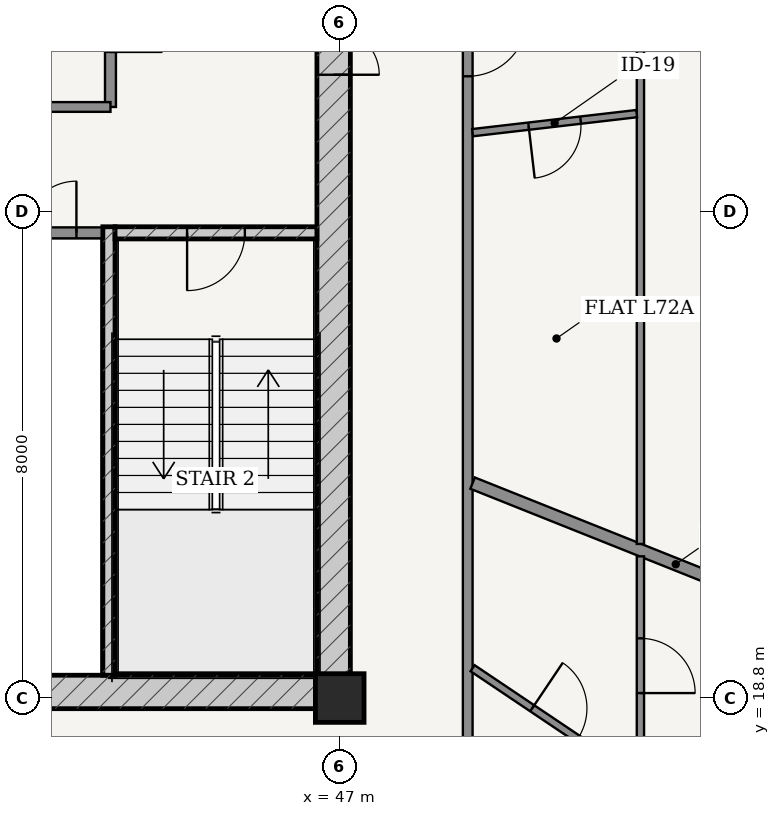
"""IFC4 building model, lengths in metres.
Left out: names, types, materials, properties, quantities, classifications, styles, units other than length and angle.
Written with IfcOpenShell. Run it as: python <this file> out.ifc"""

import sys

from ifc_helpers import new_model, si_unit, direction, frame, frame_2d, origin, origin_2d, place, context, subcontext, project, spatial, rectangle, extrude, source, transform, mapped, element, fill, save


model = new_model("IFC4")
c1 = context("Model", 3, precision=1e-05, world=origin(), true_north=direction((-0.2419218956, 0.970295726276)))
c2 = subcontext(c1, "Body", "Model", "MODEL_VIEW")
j1 = project(units=[si_unit("LENGTHUNIT", "METRE"), si_unit("PLANEANGLEUNIT", "RADIAN")], contexts=[c1])
p1 = place(None, origin())
s1 = spatial("IfcSite", under=j1, at=p1, CompositionType="ELEMENT")
p2 = place(p1, origin())
s2 = spatial("IfcBuilding", under=s1, at=p2, CompositionType="ELEMENT")
p3 = place(p2, frame((0.0, 0.0, 274.45)))
s3 = spatial("IfcBuildingStorey", under=s2, at=p3, CompositionType="ELEMENT", Elevation=274.45)
p4 = place(p3, frame((47.0, 18.8, 0.0), z_axis=(0.0, 0.0, 1.0), x_axis=(1.0, 0.0, 0.0)))
e1 = element("IfcColumn", 1, at=p4, inside=s3, PredefinedType="COLUMN", context=c2, shape_type="SweptSolid", body=[
    extrude(rectangle(XDim=0.8, YDim=0.8, at=origin_2d()), origin(), (0.0, 0.0, 1.0), 3.75),
])
p5 = place(p3, frame((28.825, 18.9, 0.0), z_axis=(0.0, 0.0, 1.0), x_axis=(1.0, 0.0, 0.0)))
e2 = element("IfcWall", 2, at=p5, inside=s3, PredefinedType="SHEAR", context=c2, shape_type="SweptSolid", body=[
    extrude(rectangle(XDim=18.35, YDim=0.55, at=frame_2d((9.175, 0.0))), origin(), (0.0, 0.0, 1.0), 3.49),
])
p6 = place(p5, frame((6.71, 0.0, 0.0)))
e3 = element("IfcOpeningElement", 3, at=p6, cuts=e2, PredefinedType="OPENING", context=c2, shape_type="SweptSolid", body=[
    extrude(rectangle(XDim=0.85, YDim=2.1, at=frame_2d((0.425, 1.05))), frame((0.0, 0.285, 0.0), z_axis=(0.0, -1.0, 0.0), x_axis=(1.0, 0.0, 0.0)), (0.0, 0.0, 1.0), 0.57),
])
p7 = place(p5, frame((8.75, 0.0, 0.0)))
e4 = element("IfcOpeningElement", 4, at=p7, cuts=e2, PredefinedType="OPENING", context=c2, shape_type="SweptSolid", body=[
    extrude(rectangle(XDim=0.85, YDim=2.1, at=frame_2d((0.425, 1.05))), frame((0.0, 0.285, 0.0), z_axis=(0.0, -1.0, 0.0), x_axis=(1.0, 0.0, 0.0)), (0.0, 0.0, 1.0), 0.57),
])
p8 = place(p5, frame((10.79, 0.0, 0.0)))
e5 = element("IfcOpeningElement", 5, at=p8, cuts=e2, PredefinedType="OPENING", context=c2, shape_type="SweptSolid", body=[
    extrude(rectangle(XDim=0.85, YDim=2.1, at=frame_2d((0.425, 1.05))), frame((0.0, 0.285, 0.0), z_axis=(0.0, -1.0, 0.0), x_axis=(1.0, 0.0, 0.0)), (0.0, 0.0, 1.0), 0.57),
])
p9 = place(p3, frame((46.9, 19.175, 0.0), z_axis=(0.0, 0.0, 1.0), x_axis=(0.0, 1.0, 0.0)))
e6 = element("IfcWall", 6, at=p9, inside=s3, PredefinedType="SHEAR", context=c2, shape_type="SweptSolid", body=[
    extrude(rectangle(XDim=15.25, YDim=0.55, at=frame_2d((7.625, 0.0))), origin(), (0.0, 0.0, 1.0), 3.49),
])
p10 = place(p9, frame((9.875, 0.0, 0.0)))
e7 = element("IfcOpeningElement", 7, at=p10, cuts=e6, PredefinedType="OPENING", context=c2, shape_type="SweptSolid", body=[
    extrude(rectangle(XDim=1.5, YDim=2.2, at=frame_2d((0.75, 1.1))), frame((0.0, 0.285, 0.0), z_axis=(0.0, -1.0, 0.0), x_axis=(1.0, 0.0, 0.0)), (0.0, 0.0, 1.0), 0.57),
])
p11 = place(p3, frame((43.205, 19.175, 0.0), z_axis=(0.0, 0.0, 1.0), x_axis=(0.0, 1.0, 0.0)))
e8 = element("IfcWall", 8, at=p11, inside=s3, PredefinedType="SOLIDWALL", context=c2, shape_type="SweptSolid", body=[
    extrude(rectangle(XDim=7.375, YDim=0.2, at=frame_2d((3.688, 0.0))), origin(), (0.0, 0.0, 1.0), 3.49),
])
p12 = place(p3, frame((43.305, 26.45, 0.0), z_axis=(0.0, 0.0, 1.0), x_axis=(1.0, 0.0, 0.0)))
e9 = element("IfcWall", 9, at=p12, inside=s3, PredefinedType="SOLIDWALL", context=c2, shape_type="SweptSolid", body=[
    extrude(rectangle(XDim=3.32, YDim=0.2, at=frame_2d((1.66, 0.0))), origin(), (0.0, 0.0, 1.0), 3.49),
])
p13 = place(p12, frame((1.185, 0.0, 0.0)))
e10 = element("IfcOpeningElement", 10, at=p13, cuts=e9, PredefinedType="OPENING", context=c2, shape_type="SweptSolid", body=[
    extrude(rectangle(XDim=0.95, YDim=2.15, at=frame_2d((0.475, 1.075))), frame((0.0, 0.11, 0.0), z_axis=(0.0, -1.0, 0.0), x_axis=(1.0, 0.0, 0.0)), (0.0, 0.0, 1.0), 0.22),
])
p14 = place(p3, frame((41.39, 26.45, 0.0), z_axis=(0.0, 0.0, 1.0), x_axis=(1.0, 0.0, 0.0)))
e11 = element("IfcWall", 11, at=p14, inside=s3, PredefinedType="PARTITIONING", context=c2, shape_type="SweptSolid", body=[
    extrude(rectangle(XDim=1.71, YDim=0.18, at=frame_2d((0.855, 0.0))), origin(), (0.0, 0.0, 1.0), 3.49),
])
p15 = place(p14, frame((0.43, 0.0, 0.0)))
e12 = element("IfcOpeningElement", 12, at=p15, cuts=e11, PredefinedType="OPENING", context=c2, shape_type="SweptSolid", body=[
    extrude(rectangle(XDim=0.85, YDim=2.1, at=frame_2d((0.425, 1.05))), frame((0.0, 0.1, 0.0), z_axis=(0.0, -1.0, 0.0), x_axis=(1.0, 0.0, 0.0)), (0.0, 0.0, 1.0), 0.2),
])
p16 = place(p3, frame((43.23, 28.52, 0.0), z_axis=(0.0, 0.0, 1.0), x_axis=(0.0, 1.0, 0.0)))
e13 = element("IfcWall", 13, at=p16, inside=s3, PredefinedType="PARTITIONING", context=c2, shape_type="SweptSolid", body=[
    extrude(rectangle(XDim=5.905, YDim=0.18, at=frame_2d((2.953, 0.0))), origin(), (0.0, 0.0, 1.0), 3.49),
])
p17 = place(p16, frame((0.905, 0.0, 0.0)))
e14 = element("IfcOpeningElement", 14, at=p17, cuts=e13, PredefinedType="OPENING", context=c2, shape_type="SweptSolid", body=[
    extrude(rectangle(XDim=0.85, YDim=2.1, at=frame_2d((0.425, 1.05))), frame((0.0, 0.1, 0.0), z_axis=(0.0, -1.0, 0.0), x_axis=(1.0, 0.0, 0.0)), (0.0, 0.0, 1.0), 0.2),
])
p18 = place(p16, frame((3.655, 0.0, 0.0)))
e15 = element("IfcOpeningElement", 15, at=p18, cuts=e13, PredefinedType="OPENING", context=c2, shape_type="SweptSolid", body=[
    extrude(rectangle(XDim=1.15, YDim=2.2, at=frame_2d((0.575, 1.1))), frame((0.0, 0.1, 0.0), z_axis=(0.0, -1.0, 0.0), x_axis=(1.0, 0.0, 0.0)), (0.0, 0.0, 1.0), 0.2),
])
p19 = place(p3, frame((41.39, 28.52, 0.0), z_axis=(0.0, 0.0, 1.0), x_axis=(1.0, 0.0, 0.0)))
e16 = element("IfcWall", 16, at=p19, inside=s3, PredefinedType="PARTITIONING", context=c2, shape_type="SweptSolid", body=[
    extrude(rectangle(XDim=1.84, YDim=0.16, at=frame_2d((0.92, 0.0))), origin(), (0.0, 0.0, 1.0), 3.49),
])
p20 = place(p3, frame((49.105, 17.275, 0.0), z_axis=(0.0, 0.0, 1.0), x_axis=(0.0, 1.0, 0.0)))
e17 = element("IfcWall", 17, at=p20, inside=s3, PredefinedType="PARTITIONING", context=c2, shape_type="SweptSolid", body=[
    extrude(rectangle(XDim=13.925, YDim=0.16, at=frame_2d((6.962, 0.0))), origin(), (0.0, 0.0, 1.0), 3.015),
])
p21 = place(p20, frame((11.75, 0.0, 0.0)))
e18 = element("IfcOpeningElement", 18, at=p21, cuts=e17, PredefinedType="OPENING", context=c2, shape_type="SweptSolid", body=[
    extrude(rectangle(XDim=0.98, YDim=2.2, at=frame_2d((0.49, 1.1))), frame((0.0, 0.09, 0.0), z_axis=(0.0, -1.0, 0.0), x_axis=(1.0, 0.0, 0.0)), (0.0, 0.0, 1.0), 0.18),
])
p22 = place(p3, frame((49.185, 22.334, 0.0), z_axis=(0.0, 0.0, 1.0), x_axis=(0.928710518269, -0.370805573389, 0.0)))
e19 = element("IfcWall", 19, at=p22, inside=s3, PredefinedType="PARTITIONING", context=c2, shape_type="SweptSolid", body=[
    extrude(rectangle(XDim=7.195, YDim=0.2, at=frame_2d((3.598, 0.0))), origin(), (0.0, 0.0, 1.0), 3.121),
])
p23 = place(p3, frame((51.945, 34.12, 0.0), z_axis=(0.0, 0.0, 1.0), x_axis=(0.0, -1.0, 0.0)))
e20 = element("IfcWall", 20, at=p23, inside=s3, PredefinedType="PARTITIONING", context=c2, shape_type="SweptSolid", body=[
    extrude(rectangle(XDim=12.786, YDim=0.12, at=frame_2d((6.393, 0.0))), origin(), (0.0, 0.0, 1.0), 3.015),
])
p24 = place(p23, frame((2.562, 0.0, 0.0)))
e21 = element("IfcOpeningElement", 21, at=p24, cuts=e20, PredefinedType="OPENING", context=c2, shape_type="SweptSolid", body=[
    extrude(rectangle(XDim=0.9, YDim=2.15, at=frame_2d((0.45, 1.075))), frame((0.0, 0.07, 0.0), z_axis=(0.0, -1.0, 0.0), x_axis=(1.0, 0.0, 0.0)), (0.0, 0.0, 1.0), 0.14),
])
p25 = place(p3, frame((49.185, 28.098, 0.0), z_axis=(0.0, 0.0, 1.0), x_axis=(0.993339475655, 0.115224503057, 0.0)))
e22 = element("IfcWall", 22, at=p25, inside=s3, PredefinedType="PARTITIONING", context=c2, shape_type="SweptSolid", body=[
    extrude(rectangle(XDim=2.716, YDim=0.12, at=frame_2d((1.358, 0.0))), origin(), (0.0, 0.0, 1.0), 3.209),
])
p26 = place(p25, frame((0.928, 0.0, 0.0)))
e23 = element("IfcOpeningElement", 23, at=p26, cuts=e22, PredefinedType="OPENING", context=c2, shape_type="SweptSolid", body=[
    extrude(rectangle(XDim=0.86, YDim=2.15, at=frame_2d((0.43, 1.075))), frame((0.0, 0.07, 0.0), z_axis=(0.0, -1.0, 0.0), x_axis=(1.0, 0.0, 0.0)), (0.0, 0.0, 1.0), 0.14),
])
p27 = place(p3, frame((51.945, 21.13, 0.0), z_axis=(0.0, 0.0, 1.0), x_axis=(0.0, -1.0, 0.0)))
e24 = element("IfcWall", 24, at=p27, inside=s3, PredefinedType="PARTITIONING", context=c2, shape_type="SweptSolid", body=[
    extrude(rectangle(XDim=6.775, YDim=0.12, at=frame_2d((3.388, 0.0))), origin(), (0.0, 0.0, 1.0), 3.015),
])
p28 = place(p27, frame((1.349, 0.0, 0.0)))
e25 = element("IfcOpeningElement", 25, at=p28, cuts=e24, PredefinedType="OPENING", context=c2, shape_type="SweptSolid", body=[
    extrude(rectangle(XDim=0.9, YDim=2.15, at=frame_2d((0.45, 1.075))), frame((0.0, 0.07, 0.0), z_axis=(0.0, -1.0, 0.0), x_axis=(1.0, 0.0, 0.0)), (0.0, 0.0, 1.0), 0.14),
])
p29 = place(p3, frame((49.185, 19.29, 0.0), z_axis=(0.0, 0.0, 1.0), x_axis=(0.830215193761, -0.557443030316, 0.0)))
e26 = element("IfcWall", 26, at=p29, inside=s3, PredefinedType="PARTITIONING", context=c2, shape_type="SweptSolid", body=[
    extrude(rectangle(XDim=3.262, YDim=0.12, at=frame_2d((1.631, 0.0))), origin(), (0.0, 0.0, 1.0), 3.209),
])
p30 = place(p29, frame((1.181, 0.0, 0.0)))
e27 = element("IfcOpeningElement", 27, at=p30, cuts=e26, PredefinedType="OPENING", context=c2, shape_type="SweptSolid", body=[
    extrude(rectangle(XDim=0.9, YDim=2.15, at=frame_2d((0.45, 1.075))), frame((0.0, 0.07, 0.0), z_axis=(0.0, -1.0, 0.0), x_axis=(1.0, 0.0, 0.0)), (0.0, 0.0, 1.0), 0.14),
])
m1 = source(origin(), c2, "Body", "SweptSolid", [
    extrude(rectangle(XDim=1.5, YDim=2.2, at=frame_2d((0.75, 1.1))), frame((0.0, 0.025, 0.0), z_axis=(0.0, -1.0, 0.0), x_axis=(1.0, 0.0, 0.0)), (0.0, 0.0, 1.0), 0.05),
])
p31 = place(p10, frame((1.5, 0.0, 0.0), z_axis=(0.0, 0.0, 1.0), x_axis=(-1.0, 0.0, 0.0)))
e28 = element("IfcDoor", 28, at=p31, inside=s3, OperationType="DOUBLE_DOOR_SINGLE_SWING", PredefinedType="DOOR", context=c2, shape_type="MappedRepresentation", body=[
    mapped(m1, transform((0.0, 0.0, 0.0), scale=1.0)),
])
fill(e7, e28)
m2 = source(origin(), c2, "Body", "SweptSolid", [
    extrude(rectangle(XDim=0.95, YDim=2.15, at=frame_2d((0.475, 1.075))), frame((0.0, 0.025, 0.0), z_axis=(0.0, -1.0, 0.0), x_axis=(1.0, 0.0, 0.0)), (0.0, 0.0, 1.0), 0.05),
])
p32 = place(p13, frame((0.95, 0.0, 0.0), z_axis=(0.0, 0.0, 1.0), x_axis=(-1.0, 0.0, 0.0)))
e29 = element("IfcDoor", 29, at=p32, inside=s3, OperationType="SINGLE_SWING_RIGHT", PredefinedType="DOOR", context=c2, shape_type="MappedRepresentation", body=[
    mapped(m2, transform((0.0, 0.0, 0.0), scale=1.0)),
])
fill(e10, e29)
m3 = source(origin(), c2, "Body", "SweptSolid", [
    extrude(rectangle(XDim=0.85, YDim=2.1, at=frame_2d((0.425, 1.05))), frame((0.0, 0.025, 0.0), z_axis=(0.0, -1.0, 0.0), x_axis=(1.0, 0.0, 0.0)), (0.0, 0.0, 1.0), 0.05),
])
p33 = place(p15, origin())
e30 = element("IfcDoor", 30, at=p33, inside=s3, OperationType="SINGLE_SWING_RIGHT", PredefinedType="DOOR", context=c2, shape_type="MappedRepresentation", body=[
    mapped(m3, transform((0.0, 0.0, 0.0), scale=1.0)),
])
fill(e12, e30)
m4 = source(origin(), c2, "Body", "SweptSolid", [
    extrude(rectangle(XDim=0.98, YDim=2.2, at=frame_2d((0.49, 1.1))), frame((0.0, 0.025, 0.0), z_axis=(0.0, -1.0, 0.0), x_axis=(1.0, 0.0, 0.0)), (0.0, 0.0, 1.0), 0.05),
])
p34 = place(p21, frame((0.98, 0.0, 0.0), z_axis=(0.0, 0.0, 1.0), x_axis=(-1.0, 0.0, 0.0)))
e31 = element("IfcDoor", 31, at=p34, inside=s3, OperationType="SINGLE_SWING_LEFT", PredefinedType="DOOR", context=c2, shape_type="MappedRepresentation", body=[
    mapped(m4, transform((0.0, 0.0, 0.0), scale=1.0)),
])
fill(e18, e31)
m5 = source(origin(), c2, "Body", "SweptSolid", [
    extrude(rectangle(XDim=0.86, YDim=2.15, at=frame_2d((0.43, 1.075))), frame((0.0, 0.025, 0.0), z_axis=(0.0, -1.0, 0.0), x_axis=(1.0, 0.0, 0.0)), (0.0, 0.0, 1.0), 0.05),
])
p35 = place(p26, frame((0.86, 0.0, 0.0), z_axis=(0.0, 0.0, 1.0), x_axis=(-1.0, 0.0, 0.0)))
e32 = element("IfcDoor", 32, at=p35, inside=s3, OperationType="SINGLE_SWING_RIGHT", PredefinedType="DOOR", context=c2, shape_type="MappedRepresentation", body=[
    mapped(m5, transform((0.0, 0.0, 0.0), scale=1.0)),
])
fill(e23, e32)
m6 = source(origin(), c2, "Body", "SweptSolid", [
    extrude(rectangle(XDim=0.9, YDim=2.15, at=frame_2d((0.45, 1.075))), frame((0.0, 0.025, 0.0), z_axis=(0.0, -1.0, 0.0), x_axis=(1.0, 0.0, 0.0)), (0.0, 0.0, 1.0), 0.05),
])
p36 = place(p30, origin())
e33 = element("IfcDoor", 33, at=p36, inside=s3, OperationType="SINGLE_SWING_LEFT", PredefinedType="DOOR", context=c2, shape_type="MappedRepresentation", body=[
    mapped(m6, transform((0.0, 0.0, 0.0), scale=1.0)),
])
fill(e27, e33)
p37 = place(p28, origin())
e34 = element("IfcDoor", 34, at=p37, inside=s3, OperationType="SINGLE_SWING_RIGHT", PredefinedType="DOOR", context=c2, shape_type="MappedRepresentation", body=[
    mapped(m6, transform((0.0, 0.0, 0.0), scale=1.0)),
])
fill(e25, e34)
save(model, sys.argv[1])
